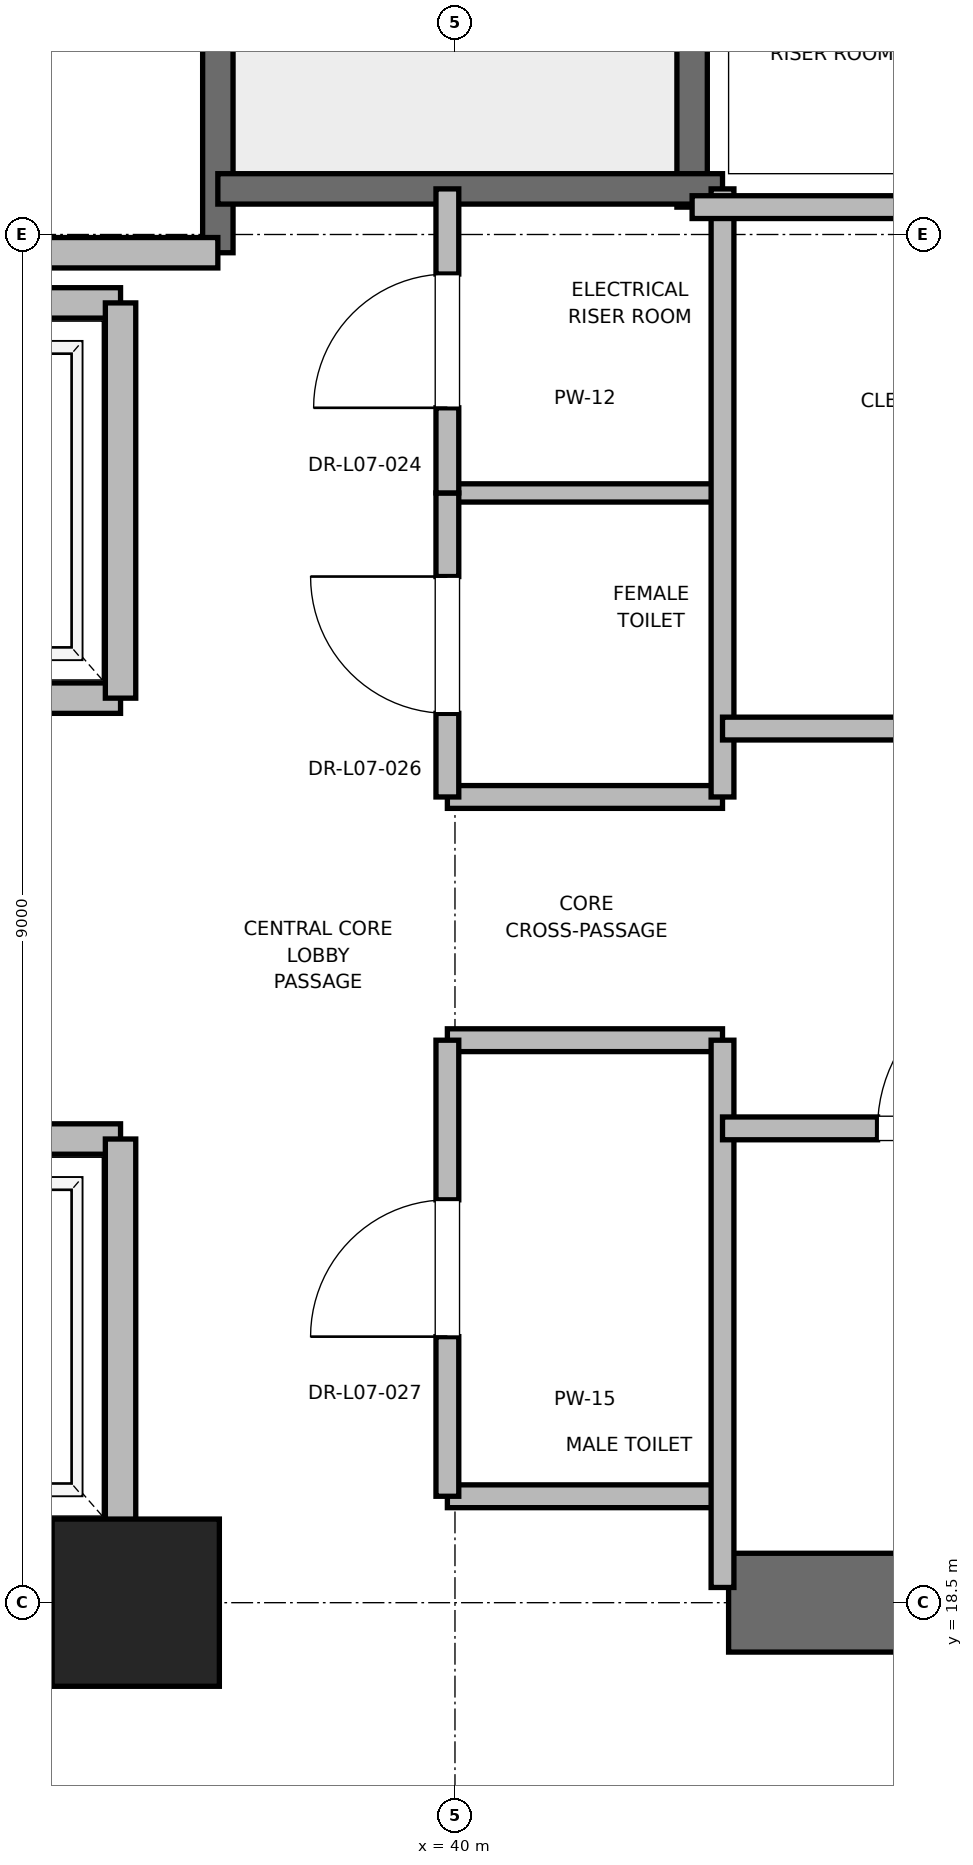
"""IFC4 building model, lengths in metres.
Left out: names, types, materials, properties, quantities, classifications, styles, units other than length and angle.
Written with IfcOpenShell. Run it as: python <this file> out.ifc"""

import sys

from ifc_helpers import new_model, si_unit, direction, frame, frame_2d, origin, origin_2d, place, context, subcontext, project, spatial, rectangle, extrude, element, fill, save


model = new_model("IFC4")
c1 = context("Model", 3, precision=1e-05, world=origin(), true_north=direction((0.0, 1.0)))
c2 = subcontext(c1, "Body", "Model", "MODEL_VIEW")
j1 = project(units=[si_unit("LENGTHUNIT", "METRE"), si_unit("PLANEANGLEUNIT", "RADIAN")], contexts=[c1])
p1 = place(None, origin())
s1 = spatial("IfcSite", under=j1, at=p1, CompositionType="ELEMENT")
p2 = place(p1, origin())
s2 = spatial("IfcBuilding", under=s1, at=p2, CompositionType="ELEMENT")
p3 = place(p2, frame((0.0, 0.0, 35.6)))
s3 = spatial("IfcBuildingStorey", under=s2, at=p3, CompositionType="ELEMENT", Elevation=35.6)
p4 = place(p3, frame((37.9, 18.5, 0.0), z_axis=(0.0, 0.0, 1.0), x_axis=(1.0, 0.0, 0.0)))
e1 = element("IfcColumn", 1, at=p4, inside=s3, PredefinedType="PILASTER", context=c2, shape_type="SweptSolid", body=[
    extrude(rectangle(XDim=1.1, YDim=1.1, at=origin_2d()), origin(), (0.0, 0.0, 1.0), 4.0),
])
for number, where, z_axis, x_axis in (
    (2, (29.0, 18.5, 0.0), (0.0, 0.0, 1.0), (1.0, 0.0, 0.0)),
    (3, (41.8, 18.5, 0.0), (0.0, 0.0, 1.0), (1.0, 0.0, 0.0)),
):
    element("IfcWall", number, at=place(p3, frame(where, z_axis=z_axis, x_axis=x_axis)), inside=s3, PredefinedType="SHEAR", context=c2, shape_type="SweptSolid", body=[
        extrude(rectangle(XDim=9.2, YDim=0.65, at=frame_2d((4.6, 0.0))), origin(), (0.0, 0.0, 1.0), 3.76),
    ])
p5 = place(p3, frame((38.44, 27.38, 0.0), z_axis=(0.0, 0.0, 1.0), x_axis=(0.0, 1.0, 0.0)))
e4 = element("IfcWall", 4, at=p5, inside=s3, PredefinedType="SOLIDWALL", context=c2, shape_type="SweptSolid", body=[
    extrude(rectangle(XDim=8.87, YDim=0.2, at=frame_2d((4.435, 0.0))), origin(), (0.0, 0.0, 1.0), 3.76),
])
p6 = place(p3, frame((41.56, 27.68, 0.0), z_axis=(0.0, 0.0, 1.0), x_axis=(0.0, 1.0, 0.0)))
e5 = element("IfcWall", 5, at=p6, inside=s3, PredefinedType="SOLIDWALL", context=c2, shape_type="SweptSolid", body=[
    extrude(rectangle(XDim=8.57, YDim=0.2, at=frame_2d((4.285, 0.0))), origin(), (0.0, 0.0, 1.0), 3.76),
])
p7 = place(p3, frame((38.44, 27.8, 0.0), z_axis=(0.0, 0.0, 1.0), x_axis=(1.0, 0.0, 0.0)))
e6 = element("IfcWall", 6, at=p7, inside=s3, PredefinedType="SOLIDWALL", context=c2, shape_type="SweptSolid", body=[
    extrude(rectangle(XDim=3.32, YDim=0.2, at=frame_2d((1.66, 0.0))), origin(), (0.0, 0.0, 1.0), 3.76),
])
p8 = place(p3, frame((32.82, 27.38, 0.0), z_axis=(0.0, 0.0, 1.0), x_axis=(1.0, 0.0, 0.0)))
e7 = element("IfcWall", 7, at=p8, inside=s3, PredefinedType="PARTITIONING", context=c2, shape_type="SweptSolid", body=[
    extrude(rectangle(XDim=5.62, YDim=0.2, at=frame_2d((2.81, 0.0))), origin(), (0.0, 0.0, 1.0), 3.76),
])
p9 = place(p3, frame((35.5, 18.95, 0.0), z_axis=(0.0, 0.0, 1.0), x_axis=(1.0, 0.0, 0.0)))
e8 = element("IfcWall", 8, at=p9, inside=s3, PredefinedType="SOLIDWALL", context=c2, shape_type="SweptSolid", body=[
    extrude(rectangle(XDim=2.3, YDim=0.2, at=frame_2d((1.15, 0.0))), origin(), (0.0, 0.0, 1.0), 2.54),
])
p10 = place(p3, frame((37.8, 21.55, 0.0), z_axis=(0.0, 0.0, 1.0), x_axis=(-1.0, 0.0, 0.0)))
e9 = element("IfcWall", 9, at=p10, inside=s3, PredefinedType="SOLIDWALL", context=c2, shape_type="SweptSolid", body=[
    extrude(rectangle(XDim=2.3, YDim=0.2, at=frame_2d((1.15, 0.0))), origin(), (0.0, 0.0, 1.0), 3.76),
])
p11 = place(p10, frame((0.6, 0.0, 0.0)))
e10 = element("IfcOpeningElement", 10, at=p11, cuts=e9, PredefinedType="OPENING", context=c2, shape_type="SweptSolid", body=[
    extrude(rectangle(XDim=1.1, YDim=2.2, at=frame_2d((0.55, 1.1))), frame((0.0, 0.1, 0.0), z_axis=(0.0, -1.0, 0.0), x_axis=(1.0, 0.0, 0.0)), (0.0, 0.0, 1.0), 0.2),
])
p12 = place(p3, frame((37.8, 18.95, 0.0), z_axis=(0.0, 0.0, 1.0), x_axis=(0.0, 1.0, 0.0)))
e11 = element("IfcWall", 11, at=p12, inside=s3, PredefinedType="SOLIDWALL", context=c2, shape_type="SweptSolid", body=[
    extrude(rectangle(XDim=2.6, YDim=0.2, at=frame_2d((1.3, 0.0))), origin(), (0.0, 0.0, 1.0), 2.54),
])
p13 = place(p3, frame((35.5, 24.45, 0.0), z_axis=(0.0, 0.0, 1.0), x_axis=(1.0, 0.0, 0.0)))
e12 = element("IfcWall", 12, at=p13, inside=s3, PredefinedType="SOLIDWALL", context=c2, shape_type="SweptSolid", body=[
    extrude(rectangle(XDim=2.3, YDim=0.2, at=frame_2d((1.15, 0.0))), origin(), (0.0, 0.0, 1.0), 3.76),
])
p14 = place(p13, frame((0.6, 0.0, 0.0)))
e13 = element("IfcOpeningElement", 13, at=p14, cuts=e12, PredefinedType="OPENING", context=c2, shape_type="SweptSolid", body=[
    extrude(rectangle(XDim=1.1, YDim=2.2, at=frame_2d((0.55, 1.1))), frame((0.0, 0.1, 0.0), z_axis=(0.0, -1.0, 0.0), x_axis=(1.0, 0.0, 0.0)), (0.0, 0.0, 1.0), 0.2),
])
p15 = place(p3, frame((37.8, 27.05, 0.0), z_axis=(0.0, 0.0, 1.0), x_axis=(-1.0, 0.0, 0.0)))
e14 = element("IfcWall", 14, at=p15, inside=s3, PredefinedType="SOLIDWALL", context=c2, shape_type="SweptSolid", body=[
    extrude(rectangle(XDim=2.3, YDim=0.2, at=frame_2d((1.15, 0.0))), origin(), (0.0, 0.0, 1.0), 3.76),
])
p16 = place(p3, frame((37.8, 24.45, 0.0), z_axis=(0.0, 0.0, 1.0), x_axis=(0.0, 1.0, 0.0)))
e15 = element("IfcWall", 15, at=p16, inside=s3, PredefinedType="SOLIDWALL", context=c2, shape_type="SweptSolid", body=[
    extrude(rectangle(XDim=2.6, YDim=0.2, at=frame_2d((1.3, 0.0))), origin(), (0.0, 0.0, 1.0), 3.76),
])
for number, where, z_axis, x_axis in (
    (16, (39.95, 19.2, 0.0), (0.0, 0.0, 1.0), (1.0, 0.0, 0.0)),
    (17, (39.95, 22.2, 0.0), (0.0, 0.0, 1.0), (1.0, 0.0, 0.0)),
    (18, (39.95, 23.8, 0.0), (0.0, 0.0, 1.0), (1.0, 0.0, 0.0)),
):
    element("IfcWall", number, at=place(p3, frame(where, z_axis=z_axis, x_axis=x_axis)), inside=s3, PredefinedType="PARTITIONING", context=c2, shape_type="SweptSolid", body=[
        extrude(rectangle(XDim=1.81, YDim=0.15, at=frame_2d((0.905, 0.0))), origin(), (0.0, 0.0, 1.0), 2.85),
    ])
p17 = place(p3, frame((39.95, 25.8, 0.0), z_axis=(0.0, 0.0, 1.0), x_axis=(1.0, 0.0, 0.0)))
e19 = element("IfcWall", 19, at=p17, inside=s3, PredefinedType="PARTITIONING", context=c2, shape_type="SweptSolid", body=[
    extrude(rectangle(XDim=1.81, YDim=0.12, at=frame_2d((0.905, 0.0))), origin(), (0.0, 0.0, 1.0), 2.85),
])
p18 = place(p3, frame((41.76, 18.6, 0.0), z_axis=(0.0, 0.0, 1.0), x_axis=(0.0, 1.0, 0.0)))
e20 = element("IfcWall", 20, at=p18, inside=s3, PredefinedType="PARTITIONING", context=c2, shape_type="SweptSolid", body=[
    extrude(rectangle(XDim=3.6, YDim=0.15, at=frame_2d((1.8, 0.0))), origin(), (0.0, 0.0, 1.0), 2.54),
])
p19 = place(p3, frame((41.76, 23.8, 0.0), z_axis=(0.0, 0.0, 1.0), x_axis=(0.0, 1.0, 0.0)))
e21 = element("IfcWall", 21, at=p19, inside=s3, PredefinedType="PARTITIONING", context=c2, shape_type="SweptSolid", body=[
    extrude(rectangle(XDim=4.0, YDim=0.15, at=frame_2d((2.0, 0.0))), origin(), (0.0, 0.0, 1.0), 2.85),
])
p20 = place(p3, frame((39.95, 19.2, 0.0), z_axis=(0.0, 0.0, 1.0), x_axis=(0.0, 1.0, 0.0)))
e22 = element("IfcWall", 22, at=p20, inside=s3, PredefinedType="PARTITIONING", context=c2, shape_type="SweptSolid", body=[
    extrude(rectangle(XDim=3.0, YDim=0.15, at=frame_2d((1.5, 0.0))), origin(), (0.0, 0.0, 1.0), 2.85),
])
p21 = place(p20, frame((1.05, 0.0, 0.0)))
e23 = element("IfcOpeningElement", 23, at=p21, cuts=e22, PredefinedType="OPENING", context=c2, shape_type="SweptSolid", body=[
    extrude(rectangle(XDim=0.9, YDim=2.1, at=frame_2d((0.45, 1.05))), frame((0.0, 0.075, 0.0), z_axis=(0.0, -1.0, 0.0), x_axis=(1.0, 0.0, 0.0)), (0.0, 0.0, 1.0), 0.15),
])
p22 = place(p3, frame((39.95, 23.8, 0.0), z_axis=(0.0, 0.0, 1.0), x_axis=(0.0, 1.0, 0.0)))
e24 = element("IfcWall", 24, at=p22, inside=s3, PredefinedType="PARTITIONING", context=c2, shape_type="SweptSolid", body=[
    extrude(rectangle(XDim=2.0, YDim=0.15, at=frame_2d((1.0, 0.0))), origin(), (0.0, 0.0, 1.0), 2.85),
])
p23 = place(p22, frame((0.55, 0.0, 0.0)))
e25 = element("IfcOpeningElement", 25, at=p23, cuts=e24, PredefinedType="OPENING", context=c2, shape_type="SweptSolid", body=[
    extrude(rectangle(XDim=0.9, YDim=2.1, at=frame_2d((0.45, 1.05))), frame((0.0, 0.075, 0.0), z_axis=(0.0, -1.0, 0.0), x_axis=(1.0, 0.0, 0.0)), (0.0, 0.0, 1.0), 0.15),
])
p24 = place(p3, frame((39.95, 25.8, 0.0), z_axis=(0.0, 0.0, 1.0), x_axis=(0.0, 1.0, 0.0)))
e26 = element("IfcWall", 26, at=p24, inside=s3, PredefinedType="PARTITIONING", context=c2, shape_type="SweptSolid", body=[
    extrude(rectangle(XDim=2.0, YDim=0.15, at=frame_2d((1.0, 0.0))), origin(), (0.0, 0.0, 1.0), 2.85),
])
p25 = place(p24, frame((0.56, 0.0, 0.0)))
e27 = element("IfcOpeningElement", 27, at=p25, cuts=e26, PredefinedType="OPENING", context=c2, shape_type="SweptSolid", body=[
    extrude(rectangle(XDim=0.88, YDim=2.1, at=frame_2d((0.44, 1.05))), frame((0.0, 0.075, 0.0), z_axis=(0.0, -1.0, 0.0), x_axis=(1.0, 0.0, 0.0)), (0.0, 0.0, 1.0), 0.15),
])
p26 = place(p3, frame((41.56, 27.68, 0.0), z_axis=(0.0, 0.0, 1.0), x_axis=(1.0, 0.0, 0.0)))
e28 = element("IfcWall", 28, at=p26, inside=s3, PredefinedType="PARTITIONING", context=c2, shape_type="SweptSolid", body=[
    extrude(rectangle(XDim=3.59, YDim=0.15, at=frame_2d((1.795, 0.0))), origin(), (0.0, 0.0, 1.0), 2.85),
])
p27 = place(p3, frame((41.76, 21.62, 0.0), z_axis=(0.0, 0.0, 1.0), x_axis=(1.0, 0.0, 0.0)))
e29 = element("IfcWall", 29, at=p27, inside=s3, PredefinedType="PARTITIONING", context=c2, shape_type="SweptSolid", body=[
    extrude(rectangle(XDim=3.04, YDim=0.15, at=frame_2d((1.52, 0.0))), origin(), (0.0, 0.0, 1.0), 2.85),
])
p28 = place(p27, frame((1.02, 0.0, 0.0)))
e30 = element("IfcOpeningElement", 30, at=p28, cuts=e29, PredefinedType="OPENING", context=c2, shape_type="SweptSolid", body=[
    extrude(rectangle(XDim=1.0, YDim=2.15, at=frame_2d((0.5, 1.075))), frame((0.0, 0.075, 0.0), z_axis=(0.0, -1.0, 0.0), x_axis=(1.0, 0.0, 0.0)), (0.0, 0.0, 1.0), 0.15),
])
p29 = place(p3, frame((41.76, 24.25, 0.0), z_axis=(0.0, 0.0, 1.0), x_axis=(1.0, 0.0, 0.0)))
e31 = element("IfcWall", 31, at=p29, inside=s3, PredefinedType="PARTITIONING", context=c2, shape_type="SweptSolid", body=[
    extrude(rectangle(XDim=3.39, YDim=0.15, at=frame_2d((1.695, 0.0))), origin(), (0.0, 0.0, 1.0), 2.85),
])
p30 = place(p29, frame((1.255, 0.0, 0.0)))
e32 = element("IfcOpeningElement", 32, at=p30, cuts=e31, PredefinedType="OPENING", context=c2, shape_type="SweptSolid", body=[
    extrude(rectangle(XDim=0.88, YDim=2.1, at=frame_2d((0.44, 1.05))), frame((0.0, 0.075, 0.0), z_axis=(0.0, -1.0, 0.0), x_axis=(1.0, 0.0, 0.0)), (0.0, 0.0, 1.0), 0.15),
])
p31 = place(p21, origin())
e33 = element("IfcDoor", 33, at=p31, inside=s3, OperationType="SINGLE_SWING_LEFT", PredefinedType="DOOR", context=c2, shape_type="SweptSolid", body=[
    extrude(rectangle(XDim=0.9, YDim=2.1, at=frame_2d((0.45, 1.05))), frame((0.0, 0.025, 0.0), z_axis=(0.0, -1.0, 0.0), x_axis=(1.0, 0.0, 0.0)), (0.0, 0.0, 1.0), 0.05),
])
fill(e23, e33)
p32 = place(p23, origin())
e34 = element("IfcDoor", 34, at=p32, inside=s3, OperationType="SINGLE_SWING_RIGHT", PredefinedType="DOOR", context=c2, shape_type="SweptSolid", body=[
    extrude(rectangle(XDim=0.9, YDim=2.1, at=frame_2d((0.45, 1.05))), frame((0.0, 0.025, 0.0), z_axis=(0.0, -1.0, 0.0), x_axis=(1.0, 0.0, 0.0)), (0.0, 0.0, 1.0), 0.05),
])
fill(e25, e34)
p33 = place(p25, origin())
e35 = element("IfcDoor", 35, at=p33, inside=s3, OperationType="SINGLE_SWING_LEFT", PredefinedType="DOOR", context=c2, shape_type="SweptSolid", body=[
    extrude(rectangle(XDim=0.88, YDim=2.1, at=frame_2d((0.44, 1.05))), frame((0.0, 0.025, 0.0), z_axis=(0.0, -1.0, 0.0), x_axis=(1.0, 0.0, 0.0)), (0.0, 0.0, 1.0), 0.05),
])
fill(e27, e35)
p34 = place(p28, origin())
e36 = element("IfcDoor", 36, at=p34, inside=s3, OperationType="SINGLE_SWING_RIGHT", PredefinedType="DOOR", context=c2, shape_type="SweptSolid", body=[
    extrude(rectangle(XDim=1.0, YDim=2.15, at=frame_2d((0.5, 1.075))), frame((0.0, 0.025, 0.0), z_axis=(0.0, -1.0, 0.0), x_axis=(1.0, 0.0, 0.0)), (0.0, 0.0, 1.0), 0.05),
])
fill(e30, e36)
save(model, sys.argv[1])
